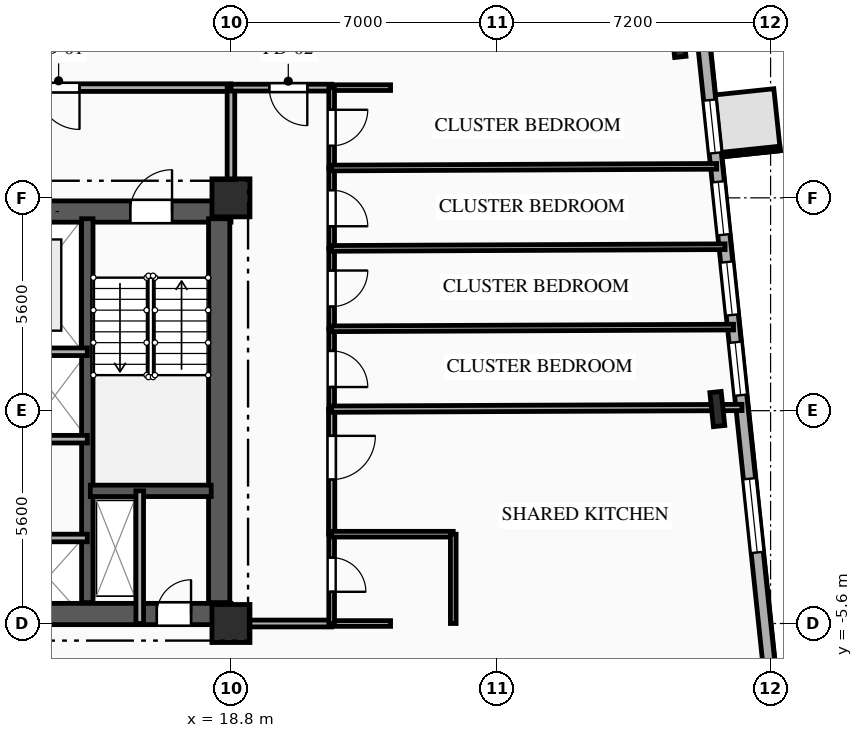
"""IFC4 building model, lengths in metres.
Left out: names, types, materials, properties, quantities, classifications, styles, units other than length and angle.
Written with IfcOpenShell. Run it as: python <this file> out.ifc"""

import sys

from ifc_helpers import new_model, si_unit, direction, frame, frame_2d, origin, origin_2d, place, context, subcontext, project, spatial, rectangle, i_section, extrude, element, fill, save


model = new_model("IFC4")
c1 = context("Model", 3, precision=1e-05, world=origin(), true_north=direction((0.0, 1.0)))
c2 = subcontext(c1, "Body", "Model", "MODEL_VIEW")
j1 = project(units=[si_unit("LENGTHUNIT", "METRE"), si_unit("PLANEANGLEUNIT", "RADIAN")], contexts=[c1])
p1 = place(None, origin())
s1 = spatial("IfcSite", under=j1, at=p1, CompositionType="ELEMENT")
p2 = place(p1, origin())
s2 = spatial("IfcBuilding", under=s1, at=p2, CompositionType="ELEMENT")
p3 = place(p2, frame((0.0, 0.0, 82.35)))
s3 = spatial("IfcBuildingStorey", under=s2, at=p3, CompositionType="ELEMENT", Elevation=82.35)
for number, where, z_axis, x_axis in (
    (1, (18.8, -5.6, 0.0), (0.0, 0.0, 1.0), (1.0, 0.0, 0.0)),
    (2, (18.8, 5.6, 0.0), (0.0, 0.0, 1.0), (1.0, 0.0, 0.0)),
):
    element("IfcColumn", number, at=place(p3, frame(where, z_axis=z_axis, x_axis=x_axis)), inside=s3, PredefinedType="COLUMN", context=c2, shape_type="SweptSolid", body=[
        extrude(rectangle(XDim=1.0, YDim=1.0, at=origin_2d()), origin(), (0.0, 0.0, 1.0), 3.35),
    ])
for number, where, z_axis, x_axis in (
    (3, (31.598, 0.043, 0.0), (0.0, 0.0, 1.0), (0.995, 0.105, 0.0)),
    (4, (30.577, 9.756, 0.0), (0.0, 0.0, 1.0), (0.995, 0.105, 0.0)),
):
    element("IfcColumn", number, at=place(p3, frame(where, z_axis=z_axis, x_axis=x_axis)), inside=s3, PredefinedType="COLUMN", context=c2, shape_type="SweptSolid", body=[
        extrude(i_section(OverallWidth=0.3, OverallDepth=0.9, WebThickness=0.019, FlangeThickness=0.035, FilletRadius=0.03, at=origin_2d()), origin(), (0.0, 0.0, 1.0), 3.35),
    ])
p4 = place(p3, frame((30.135, 20.183, 0.0), z_axis=(0.0, 0.0, 1.0), x_axis=(0.104525716865, -0.994522184023, 0.0)))
e5 = element("IfcWall", 5, at=p4, inside=s3, PredefinedType="SOLIDWALL", context=c2, shape_type="SweptSolid", body=[
    extrude(rectangle(XDim=30.6, YDim=0.32, at=frame_2d((15.3, 0.0))), origin(), (0.0, 0.0, 1.0), 3.045),
])
p5 = place(p4, frame((12.077, 0.0, 0.85)))
e6 = element("IfcOpeningElement", 6, at=p5, cuts=e5, PredefinedType="OPENING", context=c2, shape_type="SweptSolid", body=[
    extrude(rectangle(XDim=1.4, YDim=1.85, at=frame_2d((0.7, 0.925))), frame((0.0, 0.17, 0.0), z_axis=(0.0, -1.0, 0.0), x_axis=(1.0, 0.0, 0.0)), (0.0, 0.0, 1.0), 0.34),
])
p6 = place(p4, frame((14.24, 0.0, 0.85)))
e7 = element("IfcOpeningElement", 7, at=p6, cuts=e5, PredefinedType="OPENING", context=c2, shape_type="SweptSolid", body=[
    extrude(rectangle(XDim=1.4, YDim=1.85, at=frame_2d((0.7, 0.925))), frame((0.0, 0.17, 0.0), z_axis=(0.0, -1.0, 0.0), x_axis=(1.0, 0.0, 0.0)), (0.0, 0.0, 1.0), 0.34),
])
p7 = place(p4, frame((16.362, 0.0, 0.85)))
e8 = element("IfcOpeningElement", 8, at=p7, cuts=e5, PredefinedType="OPENING", context=c2, shape_type="SweptSolid", body=[
    extrude(rectangle(XDim=1.4, YDim=1.85, at=frame_2d((0.7, 0.925))), frame((0.0, 0.17, 0.0), z_axis=(0.0, -1.0, 0.0), x_axis=(1.0, 0.0, 0.0)), (0.0, 0.0, 1.0), 0.34),
])
p8 = place(p4, frame((18.485, 0.0, 0.85)))
e9 = element("IfcOpeningElement", 9, at=p8, cuts=e5, PredefinedType="OPENING", context=c2, shape_type="SweptSolid", body=[
    extrude(rectangle(XDim=1.4, YDim=1.85, at=frame_2d((0.7, 0.925))), frame((0.0, 0.17, 0.0), z_axis=(0.0, -1.0, 0.0), x_axis=(1.0, 0.0, 0.0)), (0.0, 0.0, 1.0), 0.34),
])
p9 = place(p4, frame((22.095, 0.0, 0.85)))
e10 = element("IfcOpeningElement", 10, at=p9, cuts=e5, PredefinedType="OPENING", context=c2, shape_type="SweptSolid", body=[
    extrude(rectangle(XDim=1.95, YDim=1.85, at=frame_2d((0.975, 0.925))), frame((0.0, 0.17, 0.0), z_axis=(0.0, -1.0, 0.0), x_axis=(1.0, 0.0, 0.0)), (0.0, 0.0, 1.0), 0.34),
])
p10 = place(p3, frame((9.2, 5.24, 0.0), z_axis=(0.0, 0.0, 1.0), x_axis=(1.0, 0.0, 0.0)))
e11 = element("IfcWall", 11, at=p10, inside=s3, PredefinedType="SHEAR", context=c2, shape_type="SweptSolid", body=[
    extrude(rectangle(XDim=9.6, YDim=0.56, at=frame_2d((4.8, 0.0))), origin(), (0.0, 0.0, 1.0), 3.045),
])
p11 = place(p10, frame((6.95, 0.0, 0.0)))
e12 = element("IfcOpeningElement", 12, at=p11, cuts=e11, PredefinedType="OPENING", context=c2, shape_type="SweptSolid", body=[
    extrude(rectangle(XDim=1.1, YDim=2.15, at=frame_2d((0.55, 1.075))), frame((0.0, 0.29, 0.0), z_axis=(0.0, -1.0, 0.0), x_axis=(1.0, 0.0, 0.0)), (0.0, 0.0, 1.0), 0.58),
])
p12 = place(p10, frame((3.775, 0.0, 0.0)))
e13 = element("IfcOpeningElement", 13, at=p12, cuts=e11, PredefinedType="OPENING", context=c2, shape_type="SweptSolid", body=[
    extrude(rectangle(XDim=1.05, YDim=2.1, at=frame_2d((0.525, 1.05))), frame((0.0, 0.29, 0.0), z_axis=(0.0, -1.0, 0.0), x_axis=(1.0, 0.0, 0.0)), (0.0, 0.0, 1.0), 0.58),
])
p13 = place(p3, frame((9.2, -5.35, 0.0), z_axis=(0.0, 0.0, 1.0), x_axis=(1.0, 0.0, 0.0)))
e14 = element("IfcWall", 14, at=p13, inside=s3, PredefinedType="SHEAR", context=c2, shape_type="SweptSolid", body=[
    extrude(rectangle(XDim=9.6, YDim=0.56, at=frame_2d((4.8, 0.0))), origin(), (0.0, 0.0, 1.0), 3.045),
])
p14 = place(p13, frame((7.65, 0.0, 0.0)))
e15 = element("IfcOpeningElement", 15, at=p14, cuts=e14, PredefinedType="OPENING", context=c2, shape_type="SweptSolid", body=[
    extrude(rectangle(XDim=0.9, YDim=2.1, at=frame_2d((0.45, 1.05))), frame((0.0, 0.29, 0.0), z_axis=(0.0, -1.0, 0.0), x_axis=(1.0, 0.0, 0.0)), (0.0, 0.0, 1.0), 0.58),
])
p15 = place(p3, frame((18.49, -5.05, 0.0), z_axis=(0.0, 0.0, 1.0), x_axis=(0.0, 1.0, 0.0)))
e16 = element("IfcWall", 16, at=p15, inside=s3, PredefinedType="SHEAR", context=c2, shape_type="SweptSolid", body=[
    extrude(rectangle(XDim=10.1, YDim=0.56, at=frame_2d((5.05, 0.0))), origin(), (0.0, 0.0, 1.0), 3.045),
])
p16 = place(p3, frame((15.02, -5.05, 0.0), z_axis=(0.0, 0.0, 1.0), x_axis=(0.0, 1.0, 0.0)))
e17 = element("IfcWall", 17, at=p16, inside=s3, PredefinedType="SHEAR", context=c2, shape_type="SweptSolid", body=[
    extrude(rectangle(XDim=10.1, YDim=0.3, at=frame_2d((5.05, 0.0))), origin(), (0.0, 0.0, 1.0), 3.045),
])
p17 = place(p3, frame((15.1, -2.11, 0.0), z_axis=(0.0, 0.0, 1.0), x_axis=(1.0, 0.0, 0.0)))
e18 = element("IfcWall", 18, at=p17, inside=s3, PredefinedType="SHEAR", context=c2, shape_type="SweptSolid", body=[
    extrude(rectangle(XDim=3.18, YDim=0.3, at=frame_2d((1.59, 0.0))), origin(), (0.0, 0.0, 1.0), 3.045),
])
p18 = place(p3, frame((16.4, -2.11, 0.0), z_axis=(0.0, 0.0, 1.0), x_axis=(0.0, -1.0, 0.0)))
e19 = element("IfcWall", 19, at=p18, inside=s3, PredefinedType="PARTITIONING", context=c2, shape_type="SweptSolid", body=[
    extrude(rectangle(XDim=3.49, YDim=0.2, at=frame_2d((1.745, 0.0))), origin(), (0.0, 0.0, 1.0), 3.045),
])
p19 = place(p3, frame((18.8, 8.5, 0.0), z_axis=(0.0, 0.0, 1.0), x_axis=(-1.0, 0.0, 0.0)))
e20 = element("IfcWall", 20, at=p19, inside=s3, PredefinedType="PARTITIONING", context=c2, shape_type="SweptSolid", body=[
    extrude(rectangle(XDim=6.8, YDim=0.2, at=frame_2d((3.4, 0.0))), origin(), (0.0, 0.0, 1.0), 3.045),
])
p20 = place(p19, frame((3.985, 0.0, 0.0)))
e21 = element("IfcOpeningElement", 21, at=p20, cuts=e20, PredefinedType="OPENING", context=c2, shape_type="SweptSolid", body=[
    extrude(rectangle(XDim=1.1, YDim=2.15, at=frame_2d((0.55, 1.075))), frame((0.0, 0.11, 0.0), z_axis=(0.0, -1.0, 0.0), x_axis=(1.0, 0.0, 0.0)), (0.0, 0.0, 1.0), 0.22),
])
p21 = place(p3, frame((18.8, 5.6, 0.0), z_axis=(0.0, 0.0, 1.0), x_axis=(0.0, 1.0, 0.0)))
e22 = element("IfcWall", 22, at=p21, inside=s3, PredefinedType="PARTITIONING", context=c2, shape_type="SweptSolid", body=[
    extrude(rectangle(XDim=2.9, YDim=0.2, at=frame_2d((1.45, 0.0))), origin(), (0.0, 0.0, 1.0), 2.53),
])
p22 = place(p3, frame((13.02, -3.35, 0.0), z_axis=(0.0, 0.0, 1.0), x_axis=(1.0, 0.0, 0.0)))
e23 = element("IfcWall", 23, at=p22, inside=s3, PredefinedType="PARTITIONING", context=c2, shape_type="SweptSolid", body=[
    extrude(rectangle(XDim=2.0, YDim=0.2, at=frame_2d((1.0, 0.0))), origin(), (0.0, 0.0, 1.0), 3.045),
])
p23 = place(p3, frame((15.02, -0.75, 0.0), z_axis=(0.0, 0.0, 1.0), x_axis=(-1.0, 0.0, 0.0)))
e24 = element("IfcWall", 24, at=p23, inside=s3, PredefinedType="PARTITIONING", context=c2, shape_type="SweptSolid", body=[
    extrude(rectangle(XDim=1.68, YDim=0.2, at=frame_2d((0.84, 0.0))), origin(), (0.0, 0.0, 1.0), 3.045),
])
p24 = place(p3, frame((21.45, 8.5, 0.0), z_axis=(0.0, 0.0, 1.0), x_axis=(-1.0, 0.0, 0.0)))
e25 = element("IfcWall", 25, at=p24, inside=s3, PredefinedType="PARTITIONING", context=c2, shape_type="SweptSolid", body=[
    extrude(rectangle(XDim=2.65, YDim=0.18, at=frame_2d((1.325, 0.0))), origin(), (0.0, 0.0, 1.0), 3.045),
])
p25 = place(p24, frame((0.641, 0.0, 0.0)))
e26 = element("IfcOpeningElement", 26, at=p25, cuts=e25, PredefinedType="OPENING", context=c2, shape_type="SweptSolid", body=[
    extrude(rectangle(XDim=1.0, YDim=2.15, at=frame_2d((0.5, 1.075))), frame((0.0, 0.1, 0.0), z_axis=(0.0, -1.0, 0.0), x_axis=(1.0, 0.0, 0.0)), (0.0, 0.0, 1.0), 0.2),
])
p26 = place(p3, frame((23.0, 8.5, 0.0), z_axis=(0.0, 0.0, 1.0), x_axis=(-1.0, 0.0, 0.0)))
e27 = element("IfcWall", 27, at=p26, inside=s3, PredefinedType="PARTITIONING", context=c2, shape_type="SweptSolid", body=[
    extrude(rectangle(XDim=1.55, YDim=0.15, at=frame_2d((0.775, 0.0))), origin(), (0.0, 0.0, 1.0), 3.045),
])
p27 = place(p3, frame((18.8, -5.6, 0.0), z_axis=(0.0, 0.0, 1.0), x_axis=(1.0, 0.0, 0.0)))
e28 = element("IfcWall", 28, at=p27, inside=s3, PredefinedType="PARTITIONING", context=c2, shape_type="SweptSolid", body=[
    extrude(rectangle(XDim=2.65, YDim=0.18, at=frame_2d((1.325, 0.0))), origin(), (0.0, 0.0, 1.0), 2.53),
])
p28 = place(p3, frame((21.45, -5.6, 0.0), z_axis=(0.0, 0.0, 1.0), x_axis=(1.0, 0.0, 0.0)))
e29 = element("IfcWall", 29, at=p28, inside=s3, PredefinedType="PLUMBINGWALL", context=c2, shape_type="SweptSolid", body=[
    extrude(rectangle(XDim=1.55, YDim=0.15, at=frame_2d((0.775, 0.0))), origin(), (0.0, 0.0, 1.0), 3.045),
])
p29 = place(p3, frame((21.45, -3.25, 0.0), z_axis=(0.0, 0.0, 1.0), x_axis=(0.0, -1.0, 0.0)))
e30 = element("IfcWall", 30, at=p29, inside=s3, PredefinedType="PLUMBINGWALL", context=c2, shape_type="SweptSolid", body=[
    extrude(rectangle(XDim=2.35, YDim=0.15, at=frame_2d((1.175, 0.0))), origin(), (0.0, 0.0, 1.0), 3.045),
])
p30 = place(p29, frame((0.616, 0.0, 0.0)))
e31 = element("IfcOpeningElement", 31, at=p30, cuts=e30, PredefinedType="OPENING", context=c2, shape_type="SweptSolid", body=[
    extrude(rectangle(XDim=0.9, YDim=2.1, at=frame_2d((0.45, 1.05))), frame((0.0, 0.085, 0.0), z_axis=(0.0, -1.0, 0.0), x_axis=(1.0, 0.0, 0.0)), (0.0, 0.0, 1.0), 0.17),
])
p31 = place(p3, frame((21.45, 0.04, 0.0), z_axis=(0.0, 0.0, 1.0), x_axis=(0.0, -1.0, 0.0)))
e32 = element("IfcWall", 32, at=p31, inside=s3, PredefinedType="PARTITIONING", context=c2, shape_type="SweptSolid", body=[
    extrude(rectangle(XDim=3.29, YDim=0.165, at=frame_2d((1.645, 0.0))), origin(), (0.0, 0.0, 1.0), 3.045),
])
p32 = place(p31, frame((0.702, 0.0, 0.0)))
e33 = element("IfcOpeningElement", 33, at=p32, cuts=e32, PredefinedType="OPENING", context=c2, shape_type="SweptSolid", body=[
    extrude(rectangle(XDim=1.15, YDim=2.15, at=frame_2d((0.575, 1.075))), frame((0.0, 0.093, 0.0), z_axis=(0.0, -1.0, 0.0), x_axis=(1.0, 0.0, 0.0)), (0.0, 0.0, 1.0), 0.185),
])
p33 = place(p3, frame((21.45, 2.155, 0.0), z_axis=(0.0, 0.0, 1.0), x_axis=(0.0, -1.0, 0.0)))
e34 = element("IfcWall", 34, at=p33, inside=s3, PredefinedType="PARTITIONING", context=c2, shape_type="SweptSolid", body=[
    extrude(rectangle(XDim=2.115, YDim=0.15, at=frame_2d((1.058, 0.0))), origin(), (0.0, 0.0, 1.0), 3.045),
])
p34 = place(p33, frame((0.583, 0.0, 0.0)))
e35 = element("IfcOpeningElement", 35, at=p34, cuts=e34, PredefinedType="OPENING", context=c2, shape_type="SweptSolid", body=[
    extrude(rectangle(XDim=0.95, YDim=2.1, at=frame_2d((0.475, 1.05))), frame((0.0, 0.085, 0.0), z_axis=(0.0, -1.0, 0.0), x_axis=(1.0, 0.0, 0.0)), (0.0, 0.0, 1.0), 0.17),
])
p35 = place(p3, frame((21.45, 4.27, 0.0), z_axis=(0.0, 0.0, 1.0), x_axis=(0.0, -1.0, 0.0)))
e36 = element("IfcWall", 36, at=p35, inside=s3, PredefinedType="PARTITIONING", context=c2, shape_type="SweptSolid", body=[
    extrude(rectangle(XDim=2.115, YDim=0.15, at=frame_2d((1.058, 0.0))), origin(), (0.0, 0.0, 1.0), 3.045),
])
p36 = place(p35, frame((0.583, 0.0, 0.0)))
e37 = element("IfcOpeningElement", 37, at=p36, cuts=e36, PredefinedType="OPENING", context=c2, shape_type="SweptSolid", body=[
    extrude(rectangle(XDim=0.95, YDim=2.1, at=frame_2d((0.475, 1.05))), frame((0.0, 0.085, 0.0), z_axis=(0.0, -1.0, 0.0), x_axis=(1.0, 0.0, 0.0)), (0.0, 0.0, 1.0), 0.17),
])
p37 = place(p3, frame((21.45, 6.385, 0.0), z_axis=(0.0, 0.0, 1.0), x_axis=(0.0, -1.0, 0.0)))
e38 = element("IfcWall", 38, at=p37, inside=s3, PredefinedType="PARTITIONING", context=c2, shape_type="SweptSolid", body=[
    extrude(rectangle(XDim=2.115, YDim=0.15, at=frame_2d((1.058, 0.0))), origin(), (0.0, 0.0, 1.0), 3.045),
])
p38 = place(p37, frame((0.583, 0.0, 0.0)))
e39 = element("IfcOpeningElement", 39, at=p38, cuts=e38, PredefinedType="OPENING", context=c2, shape_type="SweptSolid", body=[
    extrude(rectangle(XDim=0.95, YDim=2.1, at=frame_2d((0.475, 1.05))), frame((0.0, 0.085, 0.0), z_axis=(0.0, -1.0, 0.0), x_axis=(1.0, 0.0, 0.0)), (0.0, 0.0, 1.0), 0.17),
])
p39 = place(p3, frame((21.45, 8.5, 0.0), z_axis=(0.0, 0.0, 1.0), x_axis=(0.0, -1.0, 0.0)))
e40 = element("IfcWall", 40, at=p39, inside=s3, PredefinedType="PARTITIONING", context=c2, shape_type="SweptSolid", body=[
    extrude(rectangle(XDim=2.115, YDim=0.15, at=frame_2d((1.058, 0.0))), origin(), (0.0, 0.0, 1.0), 3.045),
])
p40 = place(p39, frame((0.583, 0.0, 0.0)))
e41 = element("IfcOpeningElement", 41, at=p40, cuts=e40, PredefinedType="OPENING", context=c2, shape_type="SweptSolid", body=[
    extrude(rectangle(XDim=0.95, YDim=2.1, at=frame_2d((0.475, 1.05))), frame((0.0, 0.085, 0.0), z_axis=(0.0, -1.0, 0.0), x_axis=(1.0, 0.0, 0.0)), (0.0, 0.0, 1.0), 0.17),
])
p41 = place(p3, frame((21.45, -3.25, 0.0), z_axis=(0.0, 0.0, 1.0), x_axis=(1.0, 0.0, 0.0)))
e42 = element("IfcWall", 42, at=p41, inside=s3, PredefinedType="PLUMBINGWALL", context=c2, shape_type="SweptSolid", body=[
    extrude(rectangle(XDim=3.2, YDim=0.15, at=frame_2d((1.6, 0.0))), origin(), (0.0, 0.0, 1.0), 3.045),
])
p42 = place(p3, frame((24.65, -3.25, 0.0), z_axis=(0.0, 0.0, 1.0), x_axis=(0.0, -1.0, 0.0)))
e43 = element("IfcWall", 43, at=p42, inside=s3, PredefinedType="PLUMBINGWALL", context=c2, shape_type="SweptSolid", body=[
    extrude(rectangle(XDim=2.35, YDim=0.15, at=frame_2d((1.175, 0.0))), origin(), (0.0, 0.0, 1.0), 3.045),
])
p43 = place(p3, frame((21.45, 0.04, 0.0), z_axis=(0.0, 0.0, 1.0), x_axis=(0.999991717636, 0.004069970361, 0.0)))
e44 = element("IfcWall", 44, at=p43, inside=s3, PredefinedType="PARTITIONING", context=c2, shape_type="SweptSolid", body=[
    extrude(rectangle(XDim=10.797, YDim=0.165, at=frame_2d((5.399, 0.0))), origin(), (0.0, 0.0, 1.0), 2.53),
])
p44 = place(p3, frame((21.45, 2.155, 0.0), z_axis=(0.0, 0.0, 1.0), x_axis=(0.999991365588, 0.004155568413, 0.0)))
e45 = element("IfcWall", 45, at=p44, inside=s3, PredefinedType="PARTITIONING", context=c2, shape_type="SweptSolid", body=[
    extrude(rectangle(XDim=10.575, YDim=0.15, at=frame_2d((5.288, 0.0))), origin(), (0.0, 0.0, 1.0), 3.045),
])
p45 = place(p3, frame((21.45, 4.27, 0.0), z_axis=(0.0, 0.0, 1.0), x_axis=(0.999990991033, 0.004244744214, 0.0)))
e46 = element("IfcWall", 46, at=p45, inside=s3, PredefinedType="PARTITIONING", context=c2, shape_type="SweptSolid", body=[
    extrude(rectangle(XDim=10.353, YDim=0.15, at=frame_2d((5.176, 0.0))), origin(), (0.0, 0.0, 1.0), 3.045),
])
p46 = place(p3, frame((21.45, 6.385, 0.0), z_axis=(0.0, 0.0, 1.0), x_axis=(0.999990591112, 0.004337935759, 0.0)))
e47 = element("IfcWall", 47, at=p46, inside=s3, PredefinedType="PARTITIONING", context=c2, shape_type="SweptSolid", body=[
    extrude(rectangle(XDim=10.13, YDim=0.15, at=frame_2d((5.065, 0.0))), origin(), (0.0, 0.0, 1.0), 3.045),
])
p47 = place(p3, frame((9.2, 1.55, 0.0), z_axis=(0.0, 0.0, 1.0), x_axis=(1.0, 0.0, 0.0)))
e48 = element("IfcWall", 48, at=p47, inside=s3, PredefinedType="PARTITIONING", context=c2, shape_type="SweptSolid", body=[
    extrude(rectangle(XDim=5.82, YDim=0.2, at=frame_2d((2.91, 0.0))), origin(), (0.0, 0.0, 1.0), 3.045),
])
p48 = place(p5, origin())
e49 = element("IfcWindow", 49, at=p48, inside=s3, PartitioningType="SINGLE_PANEL", PredefinedType="WINDOW", context=c2, shape_type="SweptSolid", body=[
    extrude(rectangle(XDim=1.4, YDim=1.85, at=frame_2d((0.7, 0.925))), frame((0.0, 0.03, 0.0), z_axis=(0.0, -1.0, 0.0), x_axis=(1.0, 0.0, 0.0)), (0.0, 0.0, 1.0), 0.06),
])
fill(e6, e49)
p49 = place(p6, origin())
e50 = element("IfcWindow", 50, at=p49, inside=s3, PartitioningType="SINGLE_PANEL", PredefinedType="WINDOW", context=c2, shape_type="SweptSolid", body=[
    extrude(rectangle(XDim=1.4, YDim=1.85, at=frame_2d((0.7, 0.925))), frame((0.0, 0.03, 0.0), z_axis=(0.0, -1.0, 0.0), x_axis=(1.0, 0.0, 0.0)), (0.0, 0.0, 1.0), 0.06),
])
fill(e7, e50)
p50 = place(p7, origin())
e51 = element("IfcWindow", 51, at=p50, inside=s3, PartitioningType="SINGLE_PANEL", PredefinedType="WINDOW", context=c2, shape_type="SweptSolid", body=[
    extrude(rectangle(XDim=1.4, YDim=1.85, at=frame_2d((0.7, 0.925))), frame((0.0, 0.03, 0.0), z_axis=(0.0, -1.0, 0.0), x_axis=(1.0, 0.0, 0.0)), (0.0, 0.0, 1.0), 0.06),
])
fill(e8, e51)
p51 = place(p8, origin())
e52 = element("IfcWindow", 52, at=p51, inside=s3, PartitioningType="SINGLE_PANEL", PredefinedType="WINDOW", context=c2, shape_type="SweptSolid", body=[
    extrude(rectangle(XDim=1.4, YDim=1.85, at=frame_2d((0.7, 0.925))), frame((0.0, 0.03, 0.0), z_axis=(0.0, -1.0, 0.0), x_axis=(1.0, 0.0, 0.0)), (0.0, 0.0, 1.0), 0.06),
])
fill(e9, e52)
p52 = place(p9, origin())
e53 = element("IfcWindow", 53, at=p52, inside=s3, PartitioningType="SINGLE_PANEL", PredefinedType="WINDOW", context=c2, shape_type="SweptSolid", body=[
    extrude(rectangle(XDim=1.95, YDim=1.85, at=frame_2d((0.975, 0.925))), frame((0.0, 0.03, 0.0), z_axis=(0.0, -1.0, 0.0), x_axis=(1.0, 0.0, 0.0)), (0.0, 0.0, 1.0), 0.06),
])
fill(e10, e53)
p53 = place(p11, origin())
e54 = element("IfcDoor", 54, at=p53, inside=s3, OperationType="SINGLE_SWING_RIGHT", PredefinedType="DOOR", context=c2, shape_type="SweptSolid", body=[
    extrude(rectangle(XDim=1.1, YDim=2.15, at=frame_2d((0.55, 1.075))), frame((0.0, 0.025, 0.0), z_axis=(0.0, -1.0, 0.0), x_axis=(1.0, 0.0, 0.0)), (0.0, 0.0, 1.0), 0.05),
])
fill(e12, e54)
p54 = place(p14, origin())
e55 = element("IfcDoor", 55, at=p54, inside=s3, OperationType="SINGLE_SWING_RIGHT", PredefinedType="DOOR", context=c2, shape_type="SweptSolid", body=[
    extrude(rectangle(XDim=0.9, YDim=2.1, at=frame_2d((0.45, 1.05))), frame((0.0, 0.025, 0.0), z_axis=(0.0, -1.0, 0.0), x_axis=(1.0, 0.0, 0.0)), (0.0, 0.0, 1.0), 0.05),
])
fill(e15, e55)
p55 = place(p20, origin())
e56 = element("IfcDoor", 56, at=p55, inside=s3, OperationType="SINGLE_SWING_LEFT", PredefinedType="DOOR", context=c2, shape_type="SweptSolid", body=[
    extrude(rectangle(XDim=1.1, YDim=2.15, at=frame_2d((0.55, 1.075))), frame((0.0, 0.025, 0.0), z_axis=(0.0, -1.0, 0.0), x_axis=(1.0, 0.0, 0.0)), (0.0, 0.0, 1.0), 0.05),
])
fill(e21, e56)
p56 = place(p25, origin())
e57 = element("IfcDoor", 57, at=p56, inside=s3, OperationType="SINGLE_SWING_LEFT", PredefinedType="DOOR", context=c2, shape_type="SweptSolid", body=[
    extrude(rectangle(XDim=1.0, YDim=2.15, at=frame_2d((0.5, 1.075))), frame((0.0, 0.025, 0.0), z_axis=(0.0, -1.0, 0.0), x_axis=(1.0, 0.0, 0.0)), (0.0, 0.0, 1.0), 0.05),
])
fill(e26, e57)
p57 = place(p30, origin())
e58 = element("IfcDoor", 58, at=p57, inside=s3, OperationType="SINGLE_SWING_RIGHT", PredefinedType="DOOR", context=c2, shape_type="SweptSolid", body=[
    extrude(rectangle(XDim=0.9, YDim=2.1, at=frame_2d((0.45, 1.05))), frame((0.0, 0.025, 0.0), z_axis=(0.0, -1.0, 0.0), x_axis=(1.0, 0.0, 0.0)), (0.0, 0.0, 1.0), 0.05),
])
fill(e31, e58)
p58 = place(p32, origin())
e59 = element("IfcDoor", 59, at=p58, inside=s3, OperationType="SINGLE_SWING_LEFT", PredefinedType="DOOR", context=c2, shape_type="SweptSolid", body=[
    extrude(rectangle(XDim=1.15, YDim=2.15, at=frame_2d((0.575, 1.075))), frame((0.0, 0.025, 0.0), z_axis=(0.0, -1.0, 0.0), x_axis=(1.0, 0.0, 0.0)), (0.0, 0.0, 1.0), 0.05),
])
fill(e33, e59)
p59 = place(p34, origin())
e60 = element("IfcDoor", 60, at=p59, inside=s3, OperationType="SINGLE_SWING_RIGHT", PredefinedType="DOOR", context=c2, shape_type="SweptSolid", body=[
    extrude(rectangle(XDim=0.95, YDim=2.1, at=frame_2d((0.475, 1.05))), frame((0.0, 0.025, 0.0), z_axis=(0.0, -1.0, 0.0), x_axis=(1.0, 0.0, 0.0)), (0.0, 0.0, 1.0), 0.05),
])
fill(e35, e60)
p60 = place(p36, origin())
e61 = element("IfcDoor", 61, at=p60, inside=s3, OperationType="SINGLE_SWING_LEFT", PredefinedType="DOOR", context=c2, shape_type="SweptSolid", body=[
    extrude(rectangle(XDim=0.95, YDim=2.1, at=frame_2d((0.475, 1.05))), frame((0.0, 0.025, 0.0), z_axis=(0.0, -1.0, 0.0), x_axis=(1.0, 0.0, 0.0)), (0.0, 0.0, 1.0), 0.05),
])
fill(e37, e61)
p61 = place(p38, origin())
e62 = element("IfcDoor", 62, at=p61, inside=s3, OperationType="SINGLE_SWING_RIGHT", PredefinedType="DOOR", context=c2, shape_type="SweptSolid", body=[
    extrude(rectangle(XDim=0.95, YDim=2.1, at=frame_2d((0.475, 1.05))), frame((0.0, 0.025, 0.0), z_axis=(0.0, -1.0, 0.0), x_axis=(1.0, 0.0, 0.0)), (0.0, 0.0, 1.0), 0.05),
])
fill(e39, e62)
p62 = place(p40, origin())
e63 = element("IfcDoor", 63, at=p62, inside=s3, OperationType="SINGLE_SWING_LEFT", PredefinedType="DOOR", context=c2, shape_type="SweptSolid", body=[
    extrude(rectangle(XDim=0.95, YDim=2.1, at=frame_2d((0.475, 1.05))), frame((0.0, 0.025, 0.0), z_axis=(0.0, -1.0, 0.0), x_axis=(1.0, 0.0, 0.0)), (0.0, 0.0, 1.0), 0.05),
])
fill(e41, e63)
save(model, sys.argv[1])
